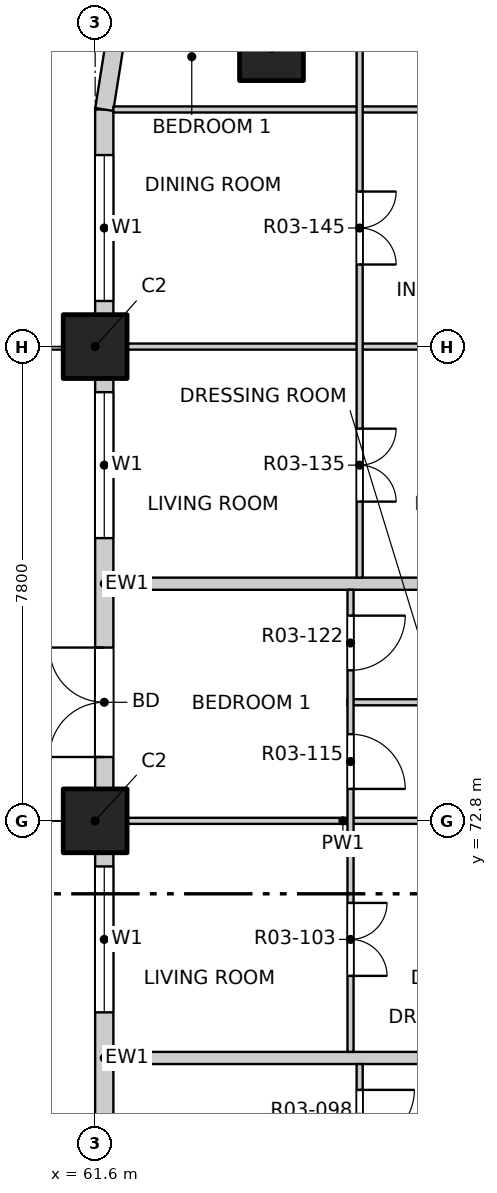
"""IFC4 building model, lengths in metres.
Left out: names, types, materials, properties, quantities, classifications, styles, units other than length and angle.
Written with IfcOpenShell. Run it as: python <this file> out.ifc"""

import sys

from ifc_helpers import new_model, si_unit, direction, frame, frame_2d, origin, origin_2d, place, context, subcontext, project, spatial, rectangle, extrude, element, fill, save


model = new_model("IFC4")
c1 = context("Model", 3, precision=1e-05, world=origin(), true_north=direction((0.0, 1.0)))
c2 = subcontext(c1, "Body", "Model", "MODEL_VIEW")
j1 = project(units=[si_unit("LENGTHUNIT", "METRE"), si_unit("PLANEANGLEUNIT", "RADIAN")], contexts=[c1])
p1 = place(None, origin())
s1 = spatial("IfcSite", under=j1, at=p1, CompositionType="ELEMENT")
p2 = place(p1, origin())
s2 = spatial("IfcBuilding", under=s1, at=p2, CompositionType="ELEMENT")
p3 = place(p2, frame((0.0, 0.0, 39.9)))
s3 = spatial("IfcBuildingStorey", under=s2, at=p3, CompositionType="ELEMENT", Elevation=39.9)
for number, where, z_axis, x_axis in (
    (1, (64.5, 85.5, -0.25), (0.0, 0.0, 1.0), (1.0, 0.0, 0.0)),
    (2, (61.6, 72.8, -0.25), (0.0, 0.0, 1.0), (1.0, 0.0, 0.0)),
    (3, (61.6, 80.6, -0.25), (0.0, 0.0, 1.0), (1.0, 0.0, 0.0)),
):
    element("IfcColumn", number, at=place(p3, frame(where, z_axis=z_axis, x_axis=x_axis)), inside=s3, PredefinedType="COLUMN", context=c2, shape_type="SweptSolid", body=[
        extrude(rectangle(XDim=1.05, YDim=1.05, at=origin_2d()), origin(), (0.0, 0.0, 1.0), 3.4),
    ])
p4 = place(p3, frame((61.75, 65.525, 0.0), z_axis=(0.0, 0.0, 1.0), x_axis=(0.0, 1.0, 0.0)))
e4 = element("IfcWall", 4, at=p4, inside=s3, PredefinedType="SOLIDWALL", context=c2, shape_type="SweptSolid", body=[
    extrude(rectangle(XDim=6.75, YDim=0.3, at=frame_2d((3.375, 0.0))), origin(), (0.0, 0.0, 1.0), 2.7),
])
p5 = place(p4, frame((0.525, 0.0, 0.0)))
e5 = element("IfcOpeningElement", 5, at=p5, cuts=e4, PredefinedType="OPENING", context=c2, shape_type="SweptSolid", body=[
    extrude(rectangle(XDim=1.8, YDim=2.4, at=frame_2d((0.9, 1.2))), frame((0.0, 0.16, 0.0), z_axis=(0.0, -1.0, 0.0), x_axis=(1.0, 0.0, 0.0)), (0.0, 0.0, 1.0), 0.32),
])
p6 = place(p4, frame((4.125, 0.0, 0.9)))
e6 = element("IfcOpeningElement", 6, at=p6, cuts=e4, PredefinedType="OPENING", context=c2, shape_type="SweptSolid", body=[
    extrude(rectangle(XDim=2.4, YDim=1.8, at=frame_2d((1.2, 0.9))), frame((0.0, 0.16, 0.0), z_axis=(0.0, -1.0, 0.0), x_axis=(1.0, 0.0, 0.0)), (0.0, 0.0, 1.0), 0.32),
])
p7 = place(p3, frame((61.75, 73.325, 0.0), z_axis=(0.0, 0.0, 1.0), x_axis=(0.0, 1.0, 0.0)))
e7 = element("IfcWall", 7, at=p7, inside=s3, PredefinedType="SOLIDWALL", context=c2, shape_type="SweptSolid", body=[
    extrude(rectangle(XDim=6.75, YDim=0.3, at=frame_2d((3.375, 0.0))), origin(), (0.0, 0.0, 1.0), 2.7),
])
p8 = place(p7, frame((0.525, 0.0, 0.0)))
e8 = element("IfcOpeningElement", 8, at=p8, cuts=e7, PredefinedType="OPENING", context=c2, shape_type="SweptSolid", body=[
    extrude(rectangle(XDim=1.8, YDim=2.4, at=frame_2d((0.9, 1.2))), frame((0.0, 0.16, 0.0), z_axis=(0.0, -1.0, 0.0), x_axis=(1.0, 0.0, 0.0)), (0.0, 0.0, 1.0), 0.32),
])
p9 = place(p7, frame((4.125, 0.0, 0.9)))
e9 = element("IfcOpeningElement", 9, at=p9, cuts=e7, PredefinedType="OPENING", context=c2, shape_type="SweptSolid", body=[
    extrude(rectangle(XDim=2.4, YDim=1.8, at=frame_2d((1.2, 0.9))), frame((0.0, 0.16, 0.0), z_axis=(0.0, -1.0, 0.0), x_axis=(1.0, 0.0, 0.0)), (0.0, 0.0, 1.0), 0.32),
])
p10 = place(p3, frame((61.75, 81.125, 0.0), z_axis=(0.0, 0.0, 1.0), x_axis=(0.0, 1.0, 0.0)))
e10 = element("IfcWall", 10, at=p10, inside=s3, PredefinedType="SOLIDWALL", context=c2, shape_type="SweptSolid", body=[
    extrude(rectangle(XDim=3.375, YDim=0.3, at=frame_2d((1.688, 0.0))), origin(), (0.0, 0.0, 1.0), 2.7),
])
p11 = place(p10, frame((0.225, 0.0, 0.9)))
e11 = element("IfcOpeningElement", 11, at=p11, cuts=e10, PredefinedType="OPENING", context=c2, shape_type="SweptSolid", body=[
    extrude(rectangle(XDim=2.4, YDim=1.8, at=frame_2d((1.2, 0.9))), frame((0.0, 0.16, 0.0), z_axis=(0.0, -1.0, 0.0), x_axis=(1.0, 0.0, 0.0)), (0.0, 0.0, 1.0), 0.32),
])
p12 = place(p3, frame((61.934, 85.659, 0.0), z_axis=(0.0, 0.0, 1.0), x_axis=(-0.156496880861, -0.987678452879, 0.0)))
e12 = element("IfcWall", 12, at=p12, inside=s3, PredefinedType="SOLIDWALL", context=c2, shape_type="SweptSolid", body=[
    extrude(rectangle(XDim=1.173, YDim=0.3, at=frame_2d((0.586, 0.0))), origin(), (0.0, 0.0, 1.0), 2.7),
])
p13 = place(p3, frame((61.9, 68.9, 0.0), z_axis=(0.0, 0.0, 1.0), x_axis=(1.0, 0.0, 0.0)))
e13 = element("IfcWall", 13, at=p13, inside=s3, PredefinedType="PARTITIONING", context=c2, shape_type="SweptSolid", body=[
    extrude(rectangle(XDim=11.5, YDim=0.2, at=frame_2d((5.75, 0.0))), origin(), (0.0, 0.0, 1.0), 3.15),
])
p14 = place(p3, frame((61.9, 72.8, 0.0), z_axis=(0.0, 0.0, 1.0), x_axis=(1.0, 0.0, 0.0)))
e14 = element("IfcWall", 14, at=p14, inside=s3, PredefinedType="PARTITIONING", context=c2, shape_type="SweptSolid", body=[
    extrude(rectangle(XDim=7.55, YDim=0.1, at=frame_2d((3.775, 0.0))), origin(), (0.0, 0.0, 1.0), 2.55),
])
p15 = place(p3, frame((65.75, 74.75, 0.0), z_axis=(0.0, 0.0, 1.0), x_axis=(1.0, 0.0, 0.0)))
e15 = element("IfcWall", 15, at=p15, inside=s3, PredefinedType="PARTITIONING", context=c2, shape_type="SweptSolid", body=[
    extrude(rectangle(XDim=3.7, YDim=0.1, at=frame_2d((1.85, 0.0))), origin(), (0.0, 0.0, 1.0), 3.15),
])
p16 = place(p3, frame((61.9, 76.7, 0.0), z_axis=(0.0, 0.0, 1.0), x_axis=(1.0, 0.0, 0.0)))
e16 = element("IfcWall", 16, at=p16, inside=s3, PredefinedType="PARTITIONING", context=c2, shape_type="SweptSolid", body=[
    extrude(rectangle(XDim=11.5, YDim=0.2, at=frame_2d((5.75, 0.0))), origin(), (0.0, 0.0, 1.0), 3.15),
])
p17 = place(p3, frame((61.9, 80.6, 0.0), z_axis=(0.0, 0.0, 1.0), x_axis=(1.0, 0.0, 0.0)))
e17 = element("IfcWall", 17, at=p17, inside=s3, PredefinedType="PARTITIONING", context=c2, shape_type="SweptSolid", body=[
    extrude(rectangle(XDim=7.55, YDim=0.1, at=frame_2d((3.775, 0.0))), origin(), (0.0, 0.0, 1.0), 2.55),
])
p18 = place(p3, frame((61.9, 84.5, 0.0), z_axis=(0.0, 0.0, 1.0), x_axis=(1.0, 0.0, 0.0)))
e18 = element("IfcWall", 18, at=p18, inside=s3, PredefinedType="PARTITIONING", context=c2, shape_type="SweptSolid", body=[
    extrude(rectangle(XDim=11.5, YDim=0.1, at=frame_2d((5.75, 0.0))), origin(), (0.0, 0.0, 1.0), 3.15),
])
p19 = place(p18, frame((7.965, 0.0, 0.0)))
e19 = element("IfcOpeningElement", 19, at=p19, cuts=e18, PredefinedType="OPENING", context=c2, shape_type="SweptSolid", body=[
    extrude(rectangle(XDim=0.9, YDim=2.1, at=frame_2d((0.45, 1.05))), frame((0.0, 0.06, 0.0), z_axis=(0.0, -1.0, 0.0), x_axis=(1.0, 0.0, 0.0)), (0.0, 0.0, 1.0), 0.12),
])
p20 = place(p3, frame((65.8, 69.0, 0.0), z_axis=(0.0, 0.0, 1.0), x_axis=(0.0, 1.0, 0.0)))
e20 = element("IfcWall", 20, at=p20, inside=s3, PredefinedType="PARTITIONING", context=c2, shape_type="SweptSolid", body=[
    extrude(rectangle(XDim=7.6, YDim=0.1, at=frame_2d((3.8, 0.0))), origin(), (0.0, 0.0, 1.0), 3.15),
])
p21 = place(p20, frame((1.25, 0.0, 0.0)))
e21 = element("IfcOpeningElement", 21, at=p21, cuts=e20, PredefinedType="OPENING", context=c2, shape_type="SweptSolid", body=[
    extrude(rectangle(XDim=1.2, YDim=2.1, at=frame_2d((0.6, 1.05))), frame((0.0, 0.06, 0.0), z_axis=(0.0, -1.0, 0.0), x_axis=(1.0, 0.0, 0.0)), (0.0, 0.0, 1.0), 0.12),
])
p22 = place(p20, frame((4.325, 0.0, 0.0)))
e22 = element("IfcOpeningElement", 22, at=p22, cuts=e20, PredefinedType="OPENING", context=c2, shape_type="SweptSolid", body=[
    extrude(rectangle(XDim=0.9, YDim=2.1, at=frame_2d((0.45, 1.05))), frame((0.0, 0.06, 0.0), z_axis=(0.0, -1.0, 0.0), x_axis=(1.0, 0.0, 0.0)), (0.0, 0.0, 1.0), 0.12),
])
p23 = place(p20, frame((6.275, 0.0, 0.0)))
e23 = element("IfcOpeningElement", 23, at=p23, cuts=e20, PredefinedType="OPENING", context=c2, shape_type="SweptSolid", body=[
    extrude(rectangle(XDim=0.9, YDim=2.1, at=frame_2d((0.45, 1.05))), frame((0.0, 0.06, 0.0), z_axis=(0.0, -1.0, 0.0), x_axis=(1.0, 0.0, 0.0)), (0.0, 0.0, 1.0), 0.12),
])
p24 = place(p3, frame((65.95, 61.2, 0.0), z_axis=(0.0, 0.0, 1.0), x_axis=(0.0, 1.0, 0.0)))
e24 = element("IfcWall", 24, at=p24, inside=s3, PredefinedType="PARTITIONING", context=c2, shape_type="SweptSolid", body=[
    extrude(rectangle(XDim=7.6, YDim=0.1, at=frame_2d((3.8, 0.0))), origin(), (0.0, 0.0, 1.0), 3.15),
])
p25 = place(p24, frame((1.25, 0.0, 0.0)))
e25 = element("IfcOpeningElement", 25, at=p25, cuts=e24, PredefinedType="OPENING", context=c2, shape_type="SweptSolid", body=[
    extrude(rectangle(XDim=1.2, YDim=2.1, at=frame_2d((0.6, 1.05))), frame((0.0, 0.06, 0.0), z_axis=(0.0, -1.0, 0.0), x_axis=(1.0, 0.0, 0.0)), (0.0, 0.0, 1.0), 0.12),
])
p26 = place(p24, frame((4.325, 0.0, 0.0)))
e26 = element("IfcOpeningElement", 26, at=p26, cuts=e24, PredefinedType="OPENING", context=c2, shape_type="SweptSolid", body=[
    extrude(rectangle(XDim=0.9, YDim=2.1, at=frame_2d((0.45, 1.05))), frame((0.0, 0.06, 0.0), z_axis=(0.0, -1.0, 0.0), x_axis=(1.0, 0.0, 0.0)), (0.0, 0.0, 1.0), 0.12),
])
p27 = place(p24, frame((6.275, 0.0, 0.0)))
e27 = element("IfcOpeningElement", 27, at=p27, cuts=e24, PredefinedType="OPENING", context=c2, shape_type="SweptSolid", body=[
    extrude(rectangle(XDim=0.9, YDim=2.1, at=frame_2d((0.45, 1.05))), frame((0.0, 0.06, 0.0), z_axis=(0.0, -1.0, 0.0), x_axis=(1.0, 0.0, 0.0)), (0.0, 0.0, 1.0), 0.12),
])
p28 = place(p3, frame((65.95, 76.8, 0.0), z_axis=(0.0, 0.0, 1.0), x_axis=(0.0, 1.0, 0.0)))
e28 = element("IfcWall", 28, at=p28, inside=s3, PredefinedType="PARTITIONING", context=c2, shape_type="SweptSolid", body=[
    extrude(rectangle(XDim=11.3, YDim=0.1, at=frame_2d((5.65, 0.0))), origin(), (0.0, 0.0, 1.0), 3.15),
])
p29 = place(p28, frame((1.25, 0.0, 0.0)))
e29 = element("IfcOpeningElement", 29, at=p29, cuts=e28, PredefinedType="OPENING", context=c2, shape_type="SweptSolid", body=[
    extrude(rectangle(XDim=1.2, YDim=2.1, at=frame_2d((0.6, 1.05))), frame((0.0, 0.06, 0.0), z_axis=(0.0, -1.0, 0.0), x_axis=(1.0, 0.0, 0.0)), (0.0, 0.0, 1.0), 0.12),
])
p30 = place(p28, frame((5.15, 0.0, 0.0)))
e30 = element("IfcOpeningElement", 30, at=p30, cuts=e28, PredefinedType="OPENING", context=c2, shape_type="SweptSolid", body=[
    extrude(rectangle(XDim=1.2, YDim=2.1, at=frame_2d((0.6, 1.05))), frame((0.0, 0.06, 0.0), z_axis=(0.0, -1.0, 0.0), x_axis=(1.0, 0.0, 0.0)), (0.0, 0.0, 1.0), 0.12),
])
p31 = place(p28, frame((9.05, 0.0, 0.0)))
e31 = element("IfcOpeningElement", 31, at=p31, cuts=e28, PredefinedType="OPENING", context=c2, shape_type="SweptSolid", body=[
    extrude(rectangle(XDim=1.2, YDim=2.1, at=frame_2d((0.6, 1.05))), frame((0.0, 0.06, 0.0), z_axis=(0.0, -1.0, 0.0), x_axis=(1.0, 0.0, 0.0)), (0.0, 0.0, 1.0), 0.12),
])
p32 = place(p6, origin())
e32 = element("IfcWindow", 32, at=p32, inside=s3, PartitioningType="DOUBLE_PANEL_VERTICAL", PredefinedType="WINDOW", context=c2, shape_type="SweptSolid", body=[
    extrude(rectangle(XDim=2.4, YDim=1.8, at=frame_2d((1.2, 0.9))), frame((0.0, 0.03, 0.0), z_axis=(0.0, -1.0, 0.0), x_axis=(1.0, 0.0, 0.0)), (0.0, 0.0, 1.0), 0.06),
])
fill(e6, e32)
p33 = place(p8, origin())
e33 = element("IfcDoor", 33, at=p33, inside=s3, OperationType="DOUBLE_DOOR_SINGLE_SWING", PredefinedType="DOOR", context=c2, shape_type="SweptSolid", body=[
    extrude(rectangle(XDim=1.8, YDim=2.4, at=frame_2d((0.9, 1.2))), frame((0.0, 0.025, 0.0), z_axis=(0.0, -1.0, 0.0), x_axis=(1.0, 0.0, 0.0)), (0.0, 0.0, 1.0), 0.05),
])
fill(e8, e33)
p34 = place(p9, origin())
e34 = element("IfcWindow", 34, at=p34, inside=s3, PartitioningType="DOUBLE_PANEL_VERTICAL", PredefinedType="WINDOW", context=c2, shape_type="SweptSolid", body=[
    extrude(rectangle(XDim=2.4, YDim=1.8, at=frame_2d((1.2, 0.9))), frame((0.0, 0.03, 0.0), z_axis=(0.0, -1.0, 0.0), x_axis=(1.0, 0.0, 0.0)), (0.0, 0.0, 1.0), 0.06),
])
fill(e9, e34)
p35 = place(p11, origin())
e35 = element("IfcWindow", 35, at=p35, inside=s3, PartitioningType="DOUBLE_PANEL_VERTICAL", PredefinedType="WINDOW", context=c2, shape_type="SweptSolid", body=[
    extrude(rectangle(XDim=2.4, YDim=1.8, at=frame_2d((1.2, 0.9))), frame((0.0, 0.03, 0.0), z_axis=(0.0, -1.0, 0.0), x_axis=(1.0, 0.0, 0.0)), (0.0, 0.0, 1.0), 0.06),
])
fill(e11, e35)
p36 = place(p27, origin())
e36 = element("IfcDoor", 36, at=p36, inside=s3, OperationType="SINGLE_SWING_LEFT", PredefinedType="DOOR", context=c2, shape_type="SweptSolid", body=[
    extrude(rectangle(XDim=0.9, YDim=2.1, at=frame_2d((0.45, 1.05))), frame((0.0, 0.025, 0.0), z_axis=(0.0, -1.0, 0.0), x_axis=(1.0, 0.0, 0.0)), (0.0, 0.0, 1.0), 0.05),
])
fill(e27, e36)
p37 = place(p21, origin())
e37 = element("IfcDoor", 37, at=p37, inside=s3, OperationType="DOUBLE_DOOR_SINGLE_SWING", PredefinedType="DOOR", context=c2, shape_type="SweptSolid", body=[
    extrude(rectangle(XDim=1.2, YDim=2.1, at=frame_2d((0.6, 1.05))), frame((0.0, 0.025, 0.0), z_axis=(0.0, -1.0, 0.0), x_axis=(1.0, 0.0, 0.0)), (0.0, 0.0, 1.0), 0.05),
])
fill(e21, e37)
p38 = place(p22, origin())
e38 = element("IfcDoor", 38, at=p38, inside=s3, OperationType="SINGLE_SWING_RIGHT", PredefinedType="DOOR", context=c2, shape_type="SweptSolid", body=[
    extrude(rectangle(XDim=0.9, YDim=2.1, at=frame_2d((0.45, 1.05))), frame((0.0, 0.025, 0.0), z_axis=(0.0, -1.0, 0.0), x_axis=(1.0, 0.0, 0.0)), (0.0, 0.0, 1.0), 0.05),
])
fill(e22, e38)
p39 = place(p23, origin())
e39 = element("IfcDoor", 39, at=p39, inside=s3, OperationType="SINGLE_SWING_LEFT", PredefinedType="DOOR", context=c2, shape_type="SweptSolid", body=[
    extrude(rectangle(XDim=0.9, YDim=2.1, at=frame_2d((0.45, 1.05))), frame((0.0, 0.025, 0.0), z_axis=(0.0, -1.0, 0.0), x_axis=(1.0, 0.0, 0.0)), (0.0, 0.0, 1.0), 0.05),
])
fill(e23, e39)
p40 = place(p29, origin())
e40 = element("IfcDoor", 40, at=p40, inside=s3, OperationType="DOUBLE_DOOR_SINGLE_SWING", PredefinedType="DOOR", context=c2, shape_type="SweptSolid", body=[
    extrude(rectangle(XDim=1.2, YDim=2.1, at=frame_2d((0.6, 1.05))), frame((0.0, 0.025, 0.0), z_axis=(0.0, -1.0, 0.0), x_axis=(1.0, 0.0, 0.0)), (0.0, 0.0, 1.0), 0.05),
])
fill(e29, e40)
p41 = place(p30, origin())
e41 = element("IfcDoor", 41, at=p41, inside=s3, OperationType="DOUBLE_DOOR_SINGLE_SWING", PredefinedType="DOOR", context=c2, shape_type="SweptSolid", body=[
    extrude(rectangle(XDim=1.2, YDim=2.1, at=frame_2d((0.6, 1.05))), frame((0.0, 0.025, 0.0), z_axis=(0.0, -1.0, 0.0), x_axis=(1.0, 0.0, 0.0)), (0.0, 0.0, 1.0), 0.05),
])
fill(e30, e41)
save(model, sys.argv[1])
